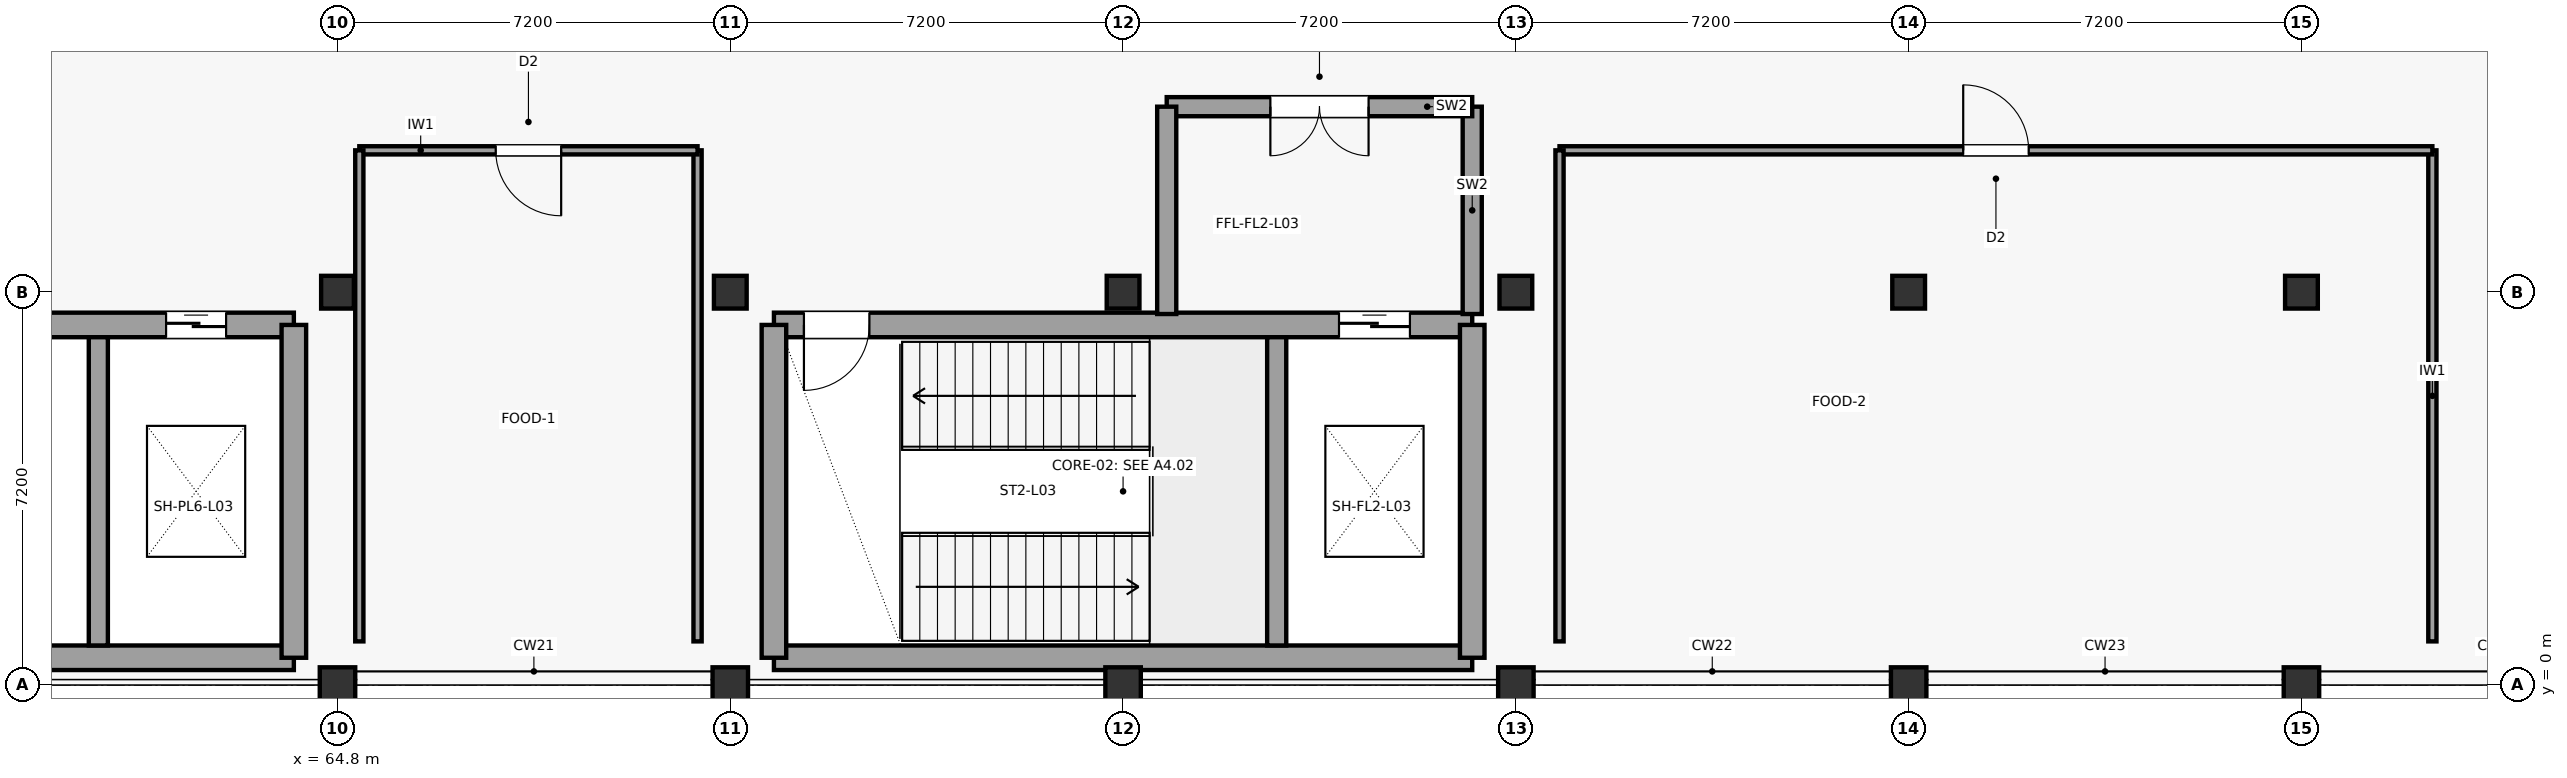
"""IFC4 building model, lengths in metres.
Left out: names, types, materials, properties, quantities, classifications, styles, units other than length and angle.
Written with IfcOpenShell. Run it as: python <this file> out.ifc"""

import sys

from ifc_helpers import new_model, si_unit, direction, frame, frame_2d, origin, origin_2d, place, context, subcontext, project, spatial, rectangle, extrude, element, fill, save


model = new_model("IFC4")
c1 = context("Model", 3, precision=1e-05, world=origin(), true_north=direction((0.0, 1.0)))
c2 = subcontext(c1, "Body", "Model", "MODEL_VIEW")
j1 = project(units=[si_unit("LENGTHUNIT", "METRE"), si_unit("PLANEANGLEUNIT", "RADIAN")], contexts=[c1])
p1 = place(None, origin())
s1 = spatial("IfcSite", under=j1, at=p1, CompositionType="ELEMENT")
p2 = place(p1, origin())
s2 = spatial("IfcBuilding", under=s1, at=p2, CompositionType="ELEMENT")
p3 = place(p2, frame((0.0, 0.0, 13.8)))
s3 = spatial("IfcBuildingStorey", under=s2, at=p3, CompositionType="ELEMENT", Elevation=13.8)
p4 = place(p3, frame((64.8, 0.0, 0.0), z_axis=(0.0, 0.0, 1.0), x_axis=(1.0, 0.0, 0.0)))
e1 = element("IfcColumn", 1, at=p4, inside=s3, PredefinedType="COLUMN", context=c2, shape_type="SweptSolid", body=[
    extrude(rectangle(XDim=0.65, YDim=0.65, at=origin_2d()), origin(), (0.0, 0.0, 1.0), 4.8),
])
p5 = place(p3, frame((64.8, 7.2, 0.0), z_axis=(0.0, 0.0, 1.0), x_axis=(1.0, 0.0, 0.0)))
e2 = element("IfcColumn", 2, at=p5, inside=s3, PredefinedType="COLUMN", context=c2, shape_type="SweptSolid", body=[
    extrude(rectangle(XDim=0.6, YDim=0.6, at=origin_2d()), origin(), (0.0, 0.0, 1.0), 4.8),
])
p6 = place(p3, frame((72.0, 0.0, 0.0), z_axis=(0.0, 0.0, 1.0), x_axis=(1.0, 0.0, 0.0)))
e3 = element("IfcColumn", 3, at=p6, inside=s3, PredefinedType="COLUMN", context=c2, shape_type="SweptSolid", body=[
    extrude(rectangle(XDim=0.65, YDim=0.65, at=origin_2d()), origin(), (0.0, 0.0, 1.0), 4.8),
])
p7 = place(p3, frame((72.0, 7.2, 0.0), z_axis=(0.0, 0.0, 1.0), x_axis=(1.0, 0.0, 0.0)))
e4 = element("IfcColumn", 4, at=p7, inside=s3, PredefinedType="COLUMN", context=c2, shape_type="SweptSolid", body=[
    extrude(rectangle(XDim=0.6, YDim=0.6, at=origin_2d()), origin(), (0.0, 0.0, 1.0), 4.8),
])
p8 = place(p3, frame((79.2, 0.0, 0.0), z_axis=(0.0, 0.0, 1.0), x_axis=(1.0, 0.0, 0.0)))
e5 = element("IfcColumn", 5, at=p8, inside=s3, PredefinedType="COLUMN", context=c2, shape_type="SweptSolid", body=[
    extrude(rectangle(XDim=0.65, YDim=0.65, at=origin_2d()), origin(), (0.0, 0.0, 1.0), 4.8),
])
p9 = place(p3, frame((79.2, 7.2, 0.0), z_axis=(0.0, 0.0, 1.0), x_axis=(1.0, 0.0, 0.0)))
e6 = element("IfcColumn", 6, at=p9, inside=s3, PredefinedType="COLUMN", context=c2, shape_type="SweptSolid", body=[
    extrude(rectangle(XDim=0.6, YDim=0.6, at=origin_2d()), origin(), (0.0, 0.0, 1.0), 4.8),
])
p10 = place(p3, frame((86.4, 0.0, 0.0), z_axis=(0.0, 0.0, 1.0), x_axis=(1.0, 0.0, 0.0)))
e7 = element("IfcColumn", 7, at=p10, inside=s3, PredefinedType="COLUMN", context=c2, shape_type="SweptSolid", body=[
    extrude(rectangle(XDim=0.65, YDim=0.65, at=origin_2d()), origin(), (0.0, 0.0, 1.0), 4.8),
])
p11 = place(p3, frame((86.4, 7.2, 0.0), z_axis=(0.0, 0.0, 1.0), x_axis=(1.0, 0.0, 0.0)))
e8 = element("IfcColumn", 8, at=p11, inside=s3, PredefinedType="COLUMN", context=c2, shape_type="SweptSolid", body=[
    extrude(rectangle(XDim=0.6, YDim=0.6, at=origin_2d()), origin(), (0.0, 0.0, 1.0), 4.8),
])
p12 = place(p3, frame((93.6, 0.0, 0.0), z_axis=(0.0, 0.0, 1.0), x_axis=(1.0, 0.0, 0.0)))
e9 = element("IfcColumn", 9, at=p12, inside=s3, PredefinedType="COLUMN", context=c2, shape_type="SweptSolid", body=[
    extrude(rectangle(XDim=0.65, YDim=0.65, at=origin_2d()), origin(), (0.0, 0.0, 1.0), 4.8),
])
p13 = place(p3, frame((93.6, 7.2, 0.0), z_axis=(0.0, 0.0, 1.0), x_axis=(1.0, 0.0, 0.0)))
e10 = element("IfcColumn", 10, at=p13, inside=s3, PredefinedType="COLUMN", context=c2, shape_type="SweptSolid", body=[
    extrude(rectangle(XDim=0.6, YDim=0.6, at=origin_2d()), origin(), (0.0, 0.0, 1.0), 4.8),
])
p14 = place(p3, frame((100.8, 0.0, 0.0), z_axis=(0.0, 0.0, 1.0), x_axis=(1.0, 0.0, 0.0)))
e11 = element("IfcColumn", 11, at=p14, inside=s3, PredefinedType="COLUMN", context=c2, shape_type="SweptSolid", body=[
    extrude(rectangle(XDim=0.65, YDim=0.65, at=origin_2d()), origin(), (0.0, 0.0, 1.0), 4.8),
])
p15 = place(p3, frame((100.8, 7.2, 0.0), z_axis=(0.0, 0.0, 1.0), x_axis=(1.0, 0.0, 0.0)))
e12 = element("IfcColumn", 12, at=p15, inside=s3, PredefinedType="COLUMN", context=c2, shape_type="SweptSolid", body=[
    extrude(rectangle(XDim=0.6, YDim=0.6, at=origin_2d()), origin(), (0.0, 0.0, 1.0), 4.8),
])
p16 = place(p3, frame((72.8, 0.5, 0.0), z_axis=(0.0, 0.0, 1.0), x_axis=(1.0, 0.0, 0.0)))
e13 = element("IfcWall", 13, at=p16, inside=s3, PredefinedType="SHEAR", context=c2, shape_type="SweptSolid", body=[
    extrude(rectangle(XDim=12.8, YDim=0.45, at=frame_2d((6.4, 0.0))), origin(), (0.0, 0.0, 1.0), 4.53),
])
p17 = place(p3, frame((72.8, 6.6, 0.0), z_axis=(0.0, 0.0, 1.0), x_axis=(1.0, 0.0, 0.0)))
e14 = element("IfcWall", 14, at=p17, inside=s3, PredefinedType="SHEAR", context=c2, shape_type="SweptSolid", body=[
    extrude(rectangle(XDim=12.8, YDim=0.45, at=frame_2d((6.4, 0.0))), origin(), (0.0, 0.0, 1.0), 4.53),
])
p18 = place(p17, frame((0.55, 0.0, 0.0)))
e15 = element("IfcOpeningElement", 15, at=p18, cuts=e14, PredefinedType="OPENING", context=c2, shape_type="SweptSolid", body=[
    extrude(rectangle(XDim=1.2, YDim=2.25, at=frame_2d((0.6, 1.125))), frame((0.0, 0.235, 0.0), z_axis=(0.0, -1.0, 0.0), x_axis=(1.0, 0.0, 0.0)), (0.0, 0.0, 1.0), 0.47),
])
p19 = place(p17, frame((10.358, 0.0, 0.0)))
e16 = element("IfcOpeningElement", 16, at=p19, cuts=e14, PredefinedType="OPENING", context=c2, shape_type="SweptSolid", body=[
    extrude(rectangle(XDim=1.3, YDim=2.25, at=frame_2d((0.65, 1.125))), frame((0.0, 0.235, 0.0), z_axis=(0.0, -1.0, 0.0), x_axis=(1.0, 0.0, 0.0)), (0.0, 0.0, 1.0), 0.47),
])
for number, where, z_axis, x_axis in (
    (17, (72.8, 0.5, 0.0), (0.0, 0.0, 1.0), (0.0, 1.0, 0.0)),
    (18, (85.6, 0.5, 0.0), (0.0, 0.0, 1.0), (0.0, 1.0, 0.0)),
):
    element("IfcWall", number, at=place(p3, frame(where, z_axis=z_axis, x_axis=x_axis)), inside=s3, PredefinedType="SHEAR", context=c2, shape_type="SweptSolid", body=[
        extrude(rectangle(XDim=6.1, YDim=0.45, at=frame_2d((3.05, 0.0))), origin(), (0.0, 0.0, 1.0), 4.53),
    ])
p20 = place(p3, frame((82.016, 0.725, 0.0), z_axis=(0.0, 0.0, 1.0), x_axis=(0.0, 1.0, 0.0)))
e19 = element("IfcWall", 19, at=p20, inside=s3, PredefinedType="SHEAR", context=c2, shape_type="SweptSolid", body=[
    extrude(rectangle(XDim=5.65, YDim=0.35, at=frame_2d((2.825, 0.0))), origin(), (0.0, 0.0, 1.0), 4.53),
])
p21 = place(p3, frame((51.2, 0.5, 0.0), z_axis=(0.0, 0.0, 1.0), x_axis=(1.0, 0.0, 0.0)))
e20 = element("IfcWall", 20, at=p21, inside=s3, PredefinedType="SHEAR", context=c2, shape_type="SweptSolid", body=[
    extrude(rectangle(XDim=12.8, YDim=0.45, at=frame_2d((6.4, 0.0))), origin(), (0.0, 0.0, 1.0), 4.53),
])
p22 = place(p3, frame((51.2, 6.6, 0.0), z_axis=(0.0, 0.0, 1.0), x_axis=(1.0, 0.0, 0.0)))
e21 = element("IfcWall", 21, at=p22, inside=s3, PredefinedType="SHEAR", context=c2, shape_type="SweptSolid", body=[
    extrude(rectangle(XDim=12.8, YDim=0.45, at=frame_2d((6.4, 0.0))), origin(), (0.0, 0.0, 1.0), 4.53),
])
p23 = place(p22, frame((0.55, 0.0, 0.0)))
e22 = element("IfcOpeningElement", 22, at=p23, cuts=e21, PredefinedType="OPENING", context=c2, shape_type="SweptSolid", body=[
    extrude(rectangle(XDim=1.2, YDim=2.25, at=frame_2d((0.6, 1.125))), frame((0.0, 0.235, 0.0), z_axis=(0.0, -1.0, 0.0), x_axis=(1.0, 0.0, 0.0)), (0.0, 0.0, 1.0), 0.47),
])
p24 = place(p22, frame((10.458, 0.0, 0.0)))
e23 = element("IfcOpeningElement", 23, at=p24, cuts=e21, PredefinedType="OPENING", context=c2, shape_type="SweptSolid", body=[
    extrude(rectangle(XDim=1.1, YDim=2.2, at=frame_2d((0.55, 1.1))), frame((0.0, 0.235, 0.0), z_axis=(0.0, -1.0, 0.0), x_axis=(1.0, 0.0, 0.0)), (0.0, 0.0, 1.0), 0.47),
])
p25 = place(p3, frame((64.0, 0.5, 0.0), z_axis=(0.0, 0.0, 1.0), x_axis=(0.0, 1.0, 0.0)))
e24 = element("IfcWall", 24, at=p25, inside=s3, PredefinedType="SHEAR", context=c2, shape_type="SweptSolid", body=[
    extrude(rectangle(XDim=6.1, YDim=0.45, at=frame_2d((3.05, 0.0))), origin(), (0.0, 0.0, 1.0), 4.53),
])
p26 = place(p3, frame((60.416, 0.725, 0.0), z_axis=(0.0, 0.0, 1.0), x_axis=(0.0, 1.0, 0.0)))
e25 = element("IfcWall", 25, at=p26, inside=s3, PredefinedType="SHEAR", context=c2, shape_type="SweptSolid", body=[
    extrude(rectangle(XDim=5.65, YDim=0.35, at=frame_2d((2.825, 0.0))), origin(), (0.0, 0.0, 1.0), 4.53),
])
p27 = place(p3, frame((85.6, 6.8, 0.0), z_axis=(0.0, 0.0, 1.0), x_axis=(0.0, 1.0, 0.0)))
e26 = element("IfcWall", 26, at=p27, inside=s3, PredefinedType="SHEAR", context=c2, shape_type="SweptSolid", body=[
    extrude(rectangle(XDim=3.8, YDim=0.35, at=frame_2d((1.9, 0.0))), origin(), (0.0, 0.0, 1.0), 3.59),
])
p28 = place(p3, frame((85.6, 10.6, 0.0), z_axis=(0.0, 0.0, 1.0), x_axis=(-1.0, 0.0, 0.0)))
e27 = element("IfcWall", 27, at=p28, inside=s3, PredefinedType="SHEAR", context=c2, shape_type="SweptSolid", body=[
    extrude(rectangle(XDim=5.6, YDim=0.35, at=frame_2d((2.8, 0.0))), origin(), (0.0, 0.0, 1.0), 3.59),
])
p29 = place(p28, frame((1.9, 0.0, 0.0)))
e28 = element("IfcOpeningElement", 28, at=p29, cuts=e27, PredefinedType="OPENING", context=c2, shape_type="SweptSolid", body=[
    extrude(rectangle(XDim=1.8, YDim=2.3, at=frame_2d((0.9, 1.15))), frame((0.0, 0.185, 0.0), z_axis=(0.0, -1.0, 0.0), x_axis=(1.0, 0.0, 0.0)), (0.0, 0.0, 1.0), 0.37),
])
p30 = place(p3, frame((80.0, 10.6, 0.0), z_axis=(0.0, 0.0, 1.0), x_axis=(0.0, -1.0, 0.0)))
e29 = element("IfcWall", 29, at=p30, inside=s3, PredefinedType="SHEAR", context=c2, shape_type="SweptSolid", body=[
    extrude(rectangle(XDim=3.8, YDim=0.35, at=frame_2d((1.9, 0.0))), origin(), (0.0, 0.0, 1.0), 3.59),
])
p31 = place(p3, frame((71.4, 0.8, 0.0), z_axis=(0.0, 0.0, 1.0), x_axis=(0.0, 1.0, 0.0)))
e30 = element("IfcWall", 30, at=p31, inside=s3, PredefinedType="PARTITIONING", context=c2, shape_type="SweptSolid", body=[
    extrude(rectangle(XDim=9.0, YDim=0.15, at=frame_2d((4.5, 0.0))), origin(), (0.0, 0.0, 1.0), 3.59),
])
p32 = place(p3, frame((71.4, 9.8, 0.0), z_axis=(0.0, 0.0, 1.0), x_axis=(-1.0, 0.0, 0.0)))
e31 = element("IfcWall", 31, at=p32, inside=s3, PredefinedType="PARTITIONING", context=c2, shape_type="SweptSolid", body=[
    extrude(rectangle(XDim=6.2, YDim=0.15, at=frame_2d((3.1, 0.0))), origin(), (0.0, 0.0, 1.0), 3.59),
])
p33 = place(p32, frame((2.5, 0.0, 0.0)))
e32 = element("IfcOpeningElement", 32, at=p33, cuts=e31, PredefinedType="OPENING", context=c2, shape_type="SweptSolid", body=[
    extrude(rectangle(XDim=1.2, YDim=2.2, at=frame_2d((0.6, 1.1))), frame((0.0, 0.085, 0.0), z_axis=(0.0, -1.0, 0.0), x_axis=(1.0, 0.0, 0.0)), (0.0, 0.0, 1.0), 0.17),
])
for number, where, z_axis, x_axis in (
    (33, (65.2, 9.8, 0.0), (0.0, 0.0, 1.0), (0.0, -1.0, 0.0)),
    (34, (103.2, 0.8, 0.0), (0.0, 0.0, 1.0), (0.0, 1.0, 0.0)),
):
    element("IfcWall", number, at=place(p3, frame(where, z_axis=z_axis, x_axis=x_axis)), inside=s3, PredefinedType="PARTITIONING", context=c2, shape_type="SweptSolid", body=[
        extrude(rectangle(XDim=9.0, YDim=0.15, at=frame_2d((4.5, 0.0))), origin(), (0.0, 0.0, 1.0), 3.59),
    ])
p34 = place(p3, frame((103.2, 9.8, 0.0), z_axis=(0.0, 0.0, 1.0), x_axis=(-1.0, 0.0, 0.0)))
e35 = element("IfcWall", 35, at=p34, inside=s3, PredefinedType="PARTITIONING", context=c2, shape_type="SweptSolid", body=[
    extrude(rectangle(XDim=16.0, YDim=0.15, at=frame_2d((8.0, 0.0))), origin(), (0.0, 0.0, 1.0), 3.59),
])
p35 = place(p34, frame((7.4, 0.0, 0.0)))
e36 = element("IfcOpeningElement", 36, at=p35, cuts=e35, PredefinedType="OPENING", context=c2, shape_type="SweptSolid", body=[
    extrude(rectangle(XDim=1.2, YDim=2.2, at=frame_2d((0.6, 1.1))), frame((0.0, 0.085, 0.0), z_axis=(0.0, -1.0, 0.0), x_axis=(1.0, 0.0, 0.0)), (0.0, 0.0, 1.0), 0.17),
])
p36 = place(p3, frame((87.2, 9.8, 0.0), z_axis=(0.0, 0.0, 1.0), x_axis=(0.0, -1.0, 0.0)))
e37 = element("IfcWall", 37, at=p36, inside=s3, PredefinedType="PARTITIONING", context=c2, shape_type="SweptSolid", body=[
    extrude(rectangle(XDim=9.0, YDim=0.15, at=frame_2d((4.5, 0.0))), origin(), (0.0, 0.0, 1.0), 3.59),
])
p37 = place(p18, frame((1.2, 0.0, 0.0), z_axis=(0.0, 0.0, 1.0), x_axis=(-1.0, 0.0, 0.0)))
e38 = element("IfcDoor", 38, at=p37, inside=s3, OperationType="SINGLE_SWING_LEFT", PredefinedType="DOOR", context=c2, shape_type="SweptSolid", body=[
    extrude(rectangle(XDim=1.2, YDim=2.25, at=frame_2d((0.6, 1.125))), frame((0.0, 0.025, 0.0), z_axis=(0.0, -1.0, 0.0), x_axis=(1.0, 0.0, 0.0)), (0.0, 0.0, 1.0), 0.05),
])
fill(e15, e38)
p38 = place(p19, origin())
e39 = element("IfcDoor", 39, at=p38, inside=s3, OperationType="SLIDING_TO_LEFT", PredefinedType="DOOR", context=c2, shape_type="SweptSolid", body=[
    extrude(rectangle(XDim=1.3, YDim=2.25, at=frame_2d((0.65, 1.125))), frame((0.0, 0.025, 0.0), z_axis=(0.0, -1.0, 0.0), x_axis=(1.0, 0.0, 0.0)), (0.0, 0.0, 1.0), 0.05),
])
fill(e16, e39)
p39 = place(p24, origin())
e40 = element("IfcDoor", 40, at=p39, inside=s3, OperationType="SLIDING_TO_RIGHT", PredefinedType="DOOR", context=c2, shape_type="SweptSolid", body=[
    extrude(rectangle(XDim=1.1, YDim=2.2, at=frame_2d((0.55, 1.1))), frame((0.0, 0.025, 0.0), z_axis=(0.0, -1.0, 0.0), x_axis=(1.0, 0.0, 0.0)), (0.0, 0.0, 1.0), 0.05),
])
fill(e23, e40)
p40 = place(p29, origin())
e41 = element("IfcDoor", 41, at=p40, inside=s3, OperationType="DOUBLE_DOOR_SINGLE_SWING", PredefinedType="DOOR", context=c2, shape_type="SweptSolid", body=[
    extrude(rectangle(XDim=1.8, YDim=2.3, at=frame_2d((0.9, 1.15))), frame((0.0, 0.025, 0.0), z_axis=(0.0, -1.0, 0.0), x_axis=(1.0, 0.0, 0.0)), (0.0, 0.0, 1.0), 0.05),
])
fill(e28, e41)
p41 = place(p33, origin())
e42 = element("IfcDoor", 42, at=p41, inside=s3, OperationType="SINGLE_SWING_LEFT", PredefinedType="DOOR", context=c2, shape_type="SweptSolid", body=[
    extrude(rectangle(XDim=1.2, YDim=2.2, at=frame_2d((0.6, 1.1))), frame((0.0, 0.025, 0.0), z_axis=(0.0, -1.0, 0.0), x_axis=(1.0, 0.0, 0.0)), (0.0, 0.0, 1.0), 0.05),
])
fill(e32, e42)
p42 = place(p35, frame((1.2, 0.0, 0.0), z_axis=(0.0, 0.0, 1.0), x_axis=(-1.0, 0.0, 0.0)))
e43 = element("IfcDoor", 43, at=p42, inside=s3, OperationType="SINGLE_SWING_RIGHT", PredefinedType="DOOR", context=c2, shape_type="SweptSolid", body=[
    extrude(rectangle(XDim=1.2, YDim=2.2, at=frame_2d((0.6, 1.1))), frame((0.0, 0.025, 0.0), z_axis=(0.0, -1.0, 0.0), x_axis=(1.0, 0.0, 0.0)), (0.0, 0.0, 1.0), 0.05),
])
fill(e36, e43)
save(model, sys.argv[1])
